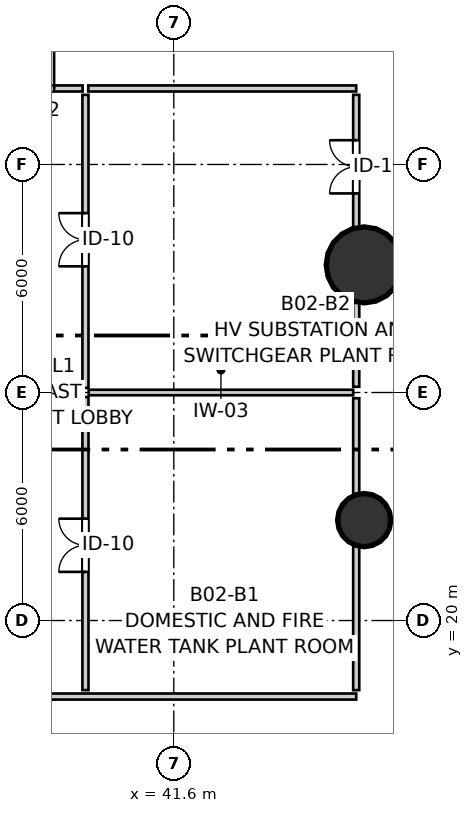
"""IFC4 building model, lengths in metres.
Left out: names, types, materials, properties, quantities, classifications, styles, units other than length and angle.
Written with IfcOpenShell. Run it as: python <this file> out.ifc"""

import sys

from ifc_helpers import new_model, si_unit, direction, frame, frame_2d, origin, origin_2d, place, context, subcontext, project, spatial, rectangle, circle, extrude, source, transform, mapped, element, fill, save


model = new_model("IFC4")
c1 = context("Model", 3, precision=1e-05, world=origin(), true_north=direction((0.0, 1.0)))
c2 = subcontext(c1, "Body", "Model", "MODEL_VIEW")
j1 = project(units=[si_unit("LENGTHUNIT", "METRE"), si_unit("PLANEANGLEUNIT", "RADIAN")], contexts=[c1])
p1 = place(None, origin())
s1 = spatial("IfcSite", under=j1, at=p1, CompositionType="ELEMENT")
p2 = place(p1, origin())
s2 = spatial("IfcBuilding", under=s1, at=p2, CompositionType="ELEMENT")
p3 = place(p2, frame((0.0, 0.0, -8.7)))
s3 = spatial("IfcBuildingStorey", under=s2, at=p3, CompositionType="ELEMENT", Elevation=-8.7)
m1 = source(origin(), c2, "Body", "SweptSolid", [
    extrude(circle(Radius=1.0, at=origin_2d()), origin(), (0.0, 0.0, 1.0), 4.495),
])
p4 = place(p3, frame((46.61, 29.357, 0.0), z_axis=(0.0, 0.0, 1.0), x_axis=(1.0, 0.0, 0.0)))
e1 = element("IfcColumn", 1, at=p4, inside=s3, PredefinedType="COLUMN", context=c2, shape_type="MappedRepresentation", body=[
    mapped(m1, transform((0.0, 0.0, 0.0), x_axis=(1.0, 0.0, 0.0), y_axis=(0.0, 1.0, 0.0), z_axis=(0.0, 0.0, 1.0), scale=1.0)),
])
m2 = source(origin(), c2, "Body", "SweptSolid", [
    extrude(circle(Radius=0.7, at=origin_2d()), origin(), (0.0, 0.0, 1.0), 4.495),
])
p5 = place(p3, frame((46.61, 22.643, 0.0), z_axis=(0.0, 0.0, 1.0), x_axis=(1.0, 0.0, 0.0)))
e2 = element("IfcColumn", 2, at=p5, inside=s3, PredefinedType="COLUMN", context=c2, shape_type="MappedRepresentation", body=[
    mapped(m2, transform((0.0, 0.0, 0.0), x_axis=(1.0, 0.0, 0.0), y_axis=(0.0, 1.0, 0.0), z_axis=(0.0, 0.0, 1.0), scale=1.0)),
])
p6 = place(p3, frame((36.7, 18.0, 0.0), z_axis=(0.0, 0.0, 1.0), x_axis=(1.0, 0.0, 0.0)))
e3 = element("IfcWall", 3, at=p6, inside=s3, PredefinedType="PARTITIONING", context=c2, shape_type="SweptSolid", body=[
    extrude(rectangle(XDim=9.7, YDim=0.16, at=frame_2d((4.85, 0.0))), origin(), (0.0, 0.0, 1.0), 4.2),
])
p7 = place(p3, frame((36.7, 34.0, 0.0), z_axis=(0.0, 0.0, 1.0), x_axis=(1.0, 0.0, 0.0)))
e4 = element("IfcWall", 4, at=p7, inside=s3, PredefinedType="PARTITIONING", context=c2, shape_type="SweptSolid", body=[
    extrude(rectangle(XDim=2.5, YDim=0.16, at=frame_2d((1.25, 0.0))), origin(), (0.0, 0.0, 1.0), 4.2),
])
p8 = place(p7, frame((0.65, 0.0, 0.0)))
e5 = element("IfcOpeningElement", 5, at=p8, cuts=e4, PredefinedType="OPENING", context=c2, shape_type="SweptSolid", body=[
    extrude(rectangle(XDim=1.1, YDim=2.15, at=frame_2d((0.55, 1.075))), frame((0.0, 0.09, 0.0), z_axis=(0.0, -1.0, 0.0), x_axis=(1.0, 0.0, 0.0)), (0.0, 0.0, 1.0), 0.18),
])
p9 = place(p3, frame((39.35, 34.0, 0.0), z_axis=(0.0, 0.0, 1.0), x_axis=(1.0, 0.0, 0.0)))
e6 = element("IfcWall", 6, at=p9, inside=s3, PredefinedType="PARTITIONING", context=c2, shape_type="SweptSolid", body=[
    extrude(rectangle(XDim=7.05, YDim=0.16, at=frame_2d((3.525, 0.0))), origin(), (0.0, 0.0, 1.0), 4.2),
])
p10 = place(p3, frame((39.275, 18.168, 0.0), z_axis=(0.0, 0.0, 1.0), x_axis=(0.0, 1.0, 0.0)))
e7 = element("IfcWall", 7, at=p10, inside=s3, PredefinedType="PARTITIONING", context=c2, shape_type="SweptSolid", body=[
    extrude(rectangle(XDim=7.712, YDim=0.16, at=frame_2d((3.856, 0.0))), origin(), (0.0, 0.0, 1.0), 4.2),
])
p11 = place(p10, frame((3.112, 0.0, 0.0)))
e8 = element("IfcOpeningElement", 8, at=p11, cuts=e7, PredefinedType="OPENING", context=c2, shape_type="SweptSolid", body=[
    extrude(rectangle(XDim=1.4, YDim=2.15, at=frame_2d((0.7, 1.075))), frame((0.0, 0.09, 0.0), z_axis=(0.0, -1.0, 0.0), x_axis=(1.0, 0.0, 0.0)), (0.0, 0.0, 1.0), 0.18),
])
p12 = place(p3, frame((39.275, 26.12, 0.0), z_axis=(0.0, 0.0, 1.0), x_axis=(0.0, 1.0, 0.0)))
e9 = element("IfcWall", 9, at=p12, inside=s3, PredefinedType="PARTITIONING", context=c2, shape_type="SweptSolid", body=[
    extrude(rectangle(XDim=7.712, YDim=0.16, at=frame_2d((3.856, 0.0))), origin(), (0.0, 0.0, 1.0), 4.2),
])
p13 = place(p12, frame((3.2, 0.0, 0.0)))
e10 = element("IfcOpeningElement", 10, at=p13, cuts=e9, PredefinedType="OPENING", context=c2, shape_type="SweptSolid", body=[
    extrude(rectangle(XDim=1.4, YDim=2.15, at=frame_2d((0.7, 1.075))), frame((0.0, 0.09, 0.0), z_axis=(0.0, -1.0, 0.0), x_axis=(1.0, 0.0, 0.0)), (0.0, 0.0, 1.0), 0.18),
])
p14 = place(p3, frame((39.36, 26.0, 0.0), z_axis=(0.0, 0.0, 1.0), x_axis=(1.0, 0.0, 0.0)))
e11 = element("IfcWall", 11, at=p14, inside=s3, PredefinedType="PARTITIONING", context=c2, shape_type="SweptSolid", body=[
    extrude(rectangle(XDim=6.96, YDim=0.145, at=frame_2d((3.48, 0.0))), origin(), (0.0, 0.0, 1.0), 4.2),
])
p15 = place(p3, frame((46.4, 18.168, 0.0), z_axis=(0.0, 0.0, 1.0), x_axis=(0.0, 1.0, 0.0)))
e12 = element("IfcWall", 12, at=p15, inside=s3, PredefinedType="PARTITIONING", context=c2, shape_type="SweptSolid", body=[
    extrude(rectangle(XDim=7.682, YDim=0.16, at=frame_2d((3.841, 0.0))), origin(), (0.0, 0.0, 1.0), 4.2),
])
p16 = place(p3, frame((46.4, 26.15, 0.0), z_axis=(0.0, 0.0, 1.0), x_axis=(0.0, 1.0, 0.0)))
e13 = element("IfcWall", 13, at=p16, inside=s3, PredefinedType="PARTITIONING", context=c2, shape_type="SweptSolid", body=[
    extrude(rectangle(XDim=7.682, YDim=0.16, at=frame_2d((3.841, 0.0))), origin(), (0.0, 0.0, 1.0), 4.2),
])
p17 = place(p16, frame((5.088, 0.0, 0.0)))
e14 = element("IfcOpeningElement", 14, at=p17, cuts=e13, PredefinedType="OPENING", context=c2, shape_type="SweptSolid", body=[
    extrude(rectangle(XDim=1.4, YDim=2.15, at=frame_2d((0.7, 1.075))), frame((0.0, 0.09, 0.0), z_axis=(0.0, -1.0, 0.0), x_axis=(1.0, 0.0, 0.0)), (0.0, 0.0, 1.0), 0.18),
])
m3 = source(origin(), c2, "Body", "SweptSolid", [
    extrude(rectangle(XDim=1.1, YDim=2.15, at=frame_2d((0.55, 1.075))), frame((0.0, 0.025, 0.0), z_axis=(0.0, -1.0, 0.0), x_axis=(1.0, 0.0, 0.0)), (0.0, 0.0, 1.0), 0.05),
])
p18 = place(p8, origin())
e15 = element("IfcDoor", 15, at=p18, inside=s3, OperationType="SINGLE_SWING_RIGHT", PredefinedType="DOOR", context=c2, shape_type="MappedRepresentation", body=[
    mapped(m3, transform((0.0, 0.0, 0.0), x_axis=(1.0, 0.0, 0.0), y_axis=(0.0, 1.0, 0.0), z_axis=(0.0, 0.0, 1.0), scale=1.0)),
])
fill(e5, e15)
m4 = source(origin(), c2, "Body", "SweptSolid", [
    extrude(rectangle(XDim=1.4, YDim=2.15, at=frame_2d((0.7, 1.075))), frame((0.0, 0.025, 0.0), z_axis=(0.0, -1.0, 0.0), x_axis=(1.0, 0.0, 0.0)), (0.0, 0.0, 1.0), 0.05),
])
p19 = place(p11, origin())
e16 = element("IfcDoor", 16, at=p19, inside=s3, OperationType="DOUBLE_DOOR_SINGLE_SWING", PredefinedType="DOOR", context=c2, shape_type="MappedRepresentation", body=[
    mapped(m4, transform((0.0, 0.0, 0.0), x_axis=(1.0, 0.0, 0.0), y_axis=(0.0, 1.0, 0.0), z_axis=(0.0, 0.0, 1.0), scale=1.0)),
])
fill(e8, e16)
p20 = place(p13, origin())
e17 = element("IfcDoor", 17, at=p20, inside=s3, OperationType="DOUBLE_DOOR_SINGLE_SWING", PredefinedType="DOOR", context=c2, shape_type="MappedRepresentation", body=[
    mapped(m4, transform((0.0, 0.0, 0.0), x_axis=(1.0, 0.0, 0.0), y_axis=(0.0, 1.0, 0.0), z_axis=(0.0, 0.0, 1.0), scale=1.0)),
])
fill(e10, e17)
p21 = place(p17, origin())
e18 = element("IfcDoor", 18, at=p21, inside=s3, OperationType="DOUBLE_DOOR_SINGLE_SWING", PredefinedType="DOOR", context=c2, shape_type="MappedRepresentation", body=[
    mapped(m4, transform((0.0, 0.0, 0.0), x_axis=(1.0, 0.0, 0.0), y_axis=(0.0, 1.0, 0.0), z_axis=(0.0, 0.0, 1.0), scale=1.0)),
])
fill(e14, e18)
save(model, sys.argv[1])
